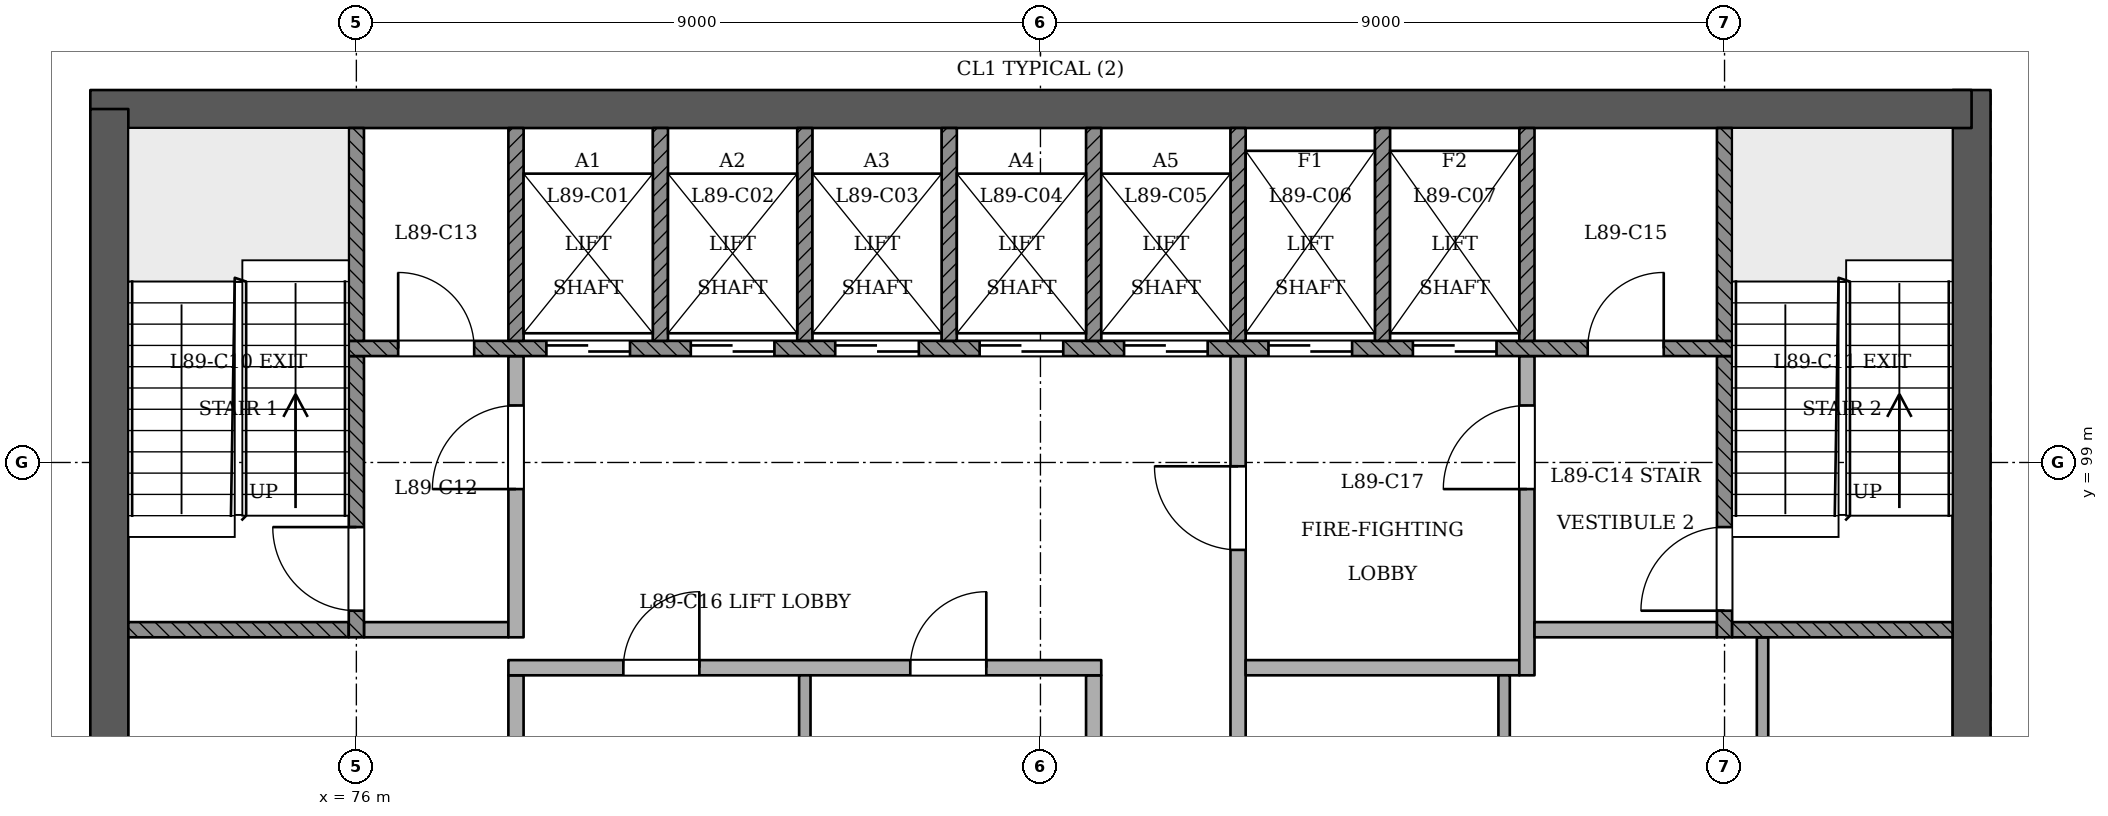
"""IFC4 building model, lengths in metres.
Left out: names, types, materials, properties, quantities, classifications, styles, units other than length and angle.
Written with IfcOpenShell. Run it as: python <this file> out.ifc"""

import sys

from ifc_helpers import new_model, si_unit, direction, frame, frame_2d, origin, place, context, subcontext, project, spatial, rectangle, extrude, element, fill, save


model = new_model("IFC4")
c1 = context("Model", 3, precision=1e-05, world=origin(), true_north=direction((0.0, 1.0)))
c2 = subcontext(c1, "Body", "Model", "MODEL_VIEW")
j1 = project(units=[si_unit("LENGTHUNIT", "METRE"), si_unit("PLANEANGLEUNIT", "RADIAN")], contexts=[c1])
p1 = place(None, origin())
s1 = spatial("IfcSite", under=j1, at=p1, CompositionType="ELEMENT")
p2 = place(p1, origin())
s2 = spatial("IfcBuilding", under=s1, at=p2, CompositionType="ELEMENT")
p3 = place(p2, frame((0.0, 0.0, 343.0)))
s3 = spatial("IfcBuildingStorey", under=s2, at=p3, CompositionType="ELEMENT", Elevation=343.0)
p4 = place(p3, frame((97.25, 93.15, 0.0), z_axis=(0.0, 0.0, 1.0), x_axis=(0.0, 1.0, 0.0)))
e1 = element("IfcWall", 1, at=p4, inside=s3, PredefinedType="SHEAR", context=c2, shape_type="SweptSolid", body=[
    extrude(rectangle(XDim=10.75, YDim=0.5, at=frame_2d((5.375, 0.0))), origin(), (0.0, 0.0, 1.0), 4.2),
])
p5 = place(p3, frame((97.25, 103.65, 0.0), z_axis=(0.0, 0.0, 1.0), x_axis=(-1.0, 0.0, 0.0)))
e2 = element("IfcWall", 2, at=p5, inside=s3, PredefinedType="SHEAR", context=c2, shape_type="SweptSolid", body=[
    extrude(rectangle(XDim=24.75, YDim=0.5, at=frame_2d((12.375, 0.0))), origin(), (0.0, 0.0, 1.0), 4.2),
])
p6 = place(p3, frame((72.75, 103.65, 0.0), z_axis=(0.0, 0.0, 1.0), x_axis=(0.0, -1.0, 0.0)))
e3 = element("IfcWall", 3, at=p6, inside=s3, PredefinedType="SHEAR", context=c2, shape_type="SweptSolid", body=[
    extrude(rectangle(XDim=10.75, YDim=0.5, at=frame_2d((5.375, 0.0))), origin(), (0.0, 0.0, 1.0), 4.2),
])
p7 = place(p3, frame((78.1, 93.4, 0.0), z_axis=(0.0, 0.0, 1.0), x_axis=(0.0, 1.0, 0.0)))
e4 = element("IfcWall", 4, at=p7, inside=s3, PredefinedType="PARTITIONING", context=c2, shape_type="SweptSolid", body=[
    extrude(rectangle(XDim=2.8, YDim=0.2, at=frame_2d((1.4, 0.0))), origin(), (0.0, 0.0, 1.0), 3.8),
])
p8 = place(p3, frame((81.9, 93.4, 0.0), z_axis=(0.0, 0.0, 1.0), x_axis=(0.0, 1.0, 0.0)))
e5 = element("IfcWall", 5, at=p8, inside=s3, PredefinedType="PARTITIONING", context=c2, shape_type="SweptSolid", body=[
    extrude(rectangle(XDim=2.8, YDim=0.15, at=frame_2d((1.4, 0.0))), origin(), (0.0, 0.0, 1.0), 3.8),
])
p9 = place(p3, frame((85.7, 93.4, 0.0), z_axis=(0.0, 0.0, 1.0), x_axis=(0.0, 1.0, 0.0)))
e6 = element("IfcWall", 6, at=p9, inside=s3, PredefinedType="PARTITIONING", context=c2, shape_type="SweptSolid", body=[
    extrude(rectangle(XDim=2.8, YDim=0.2, at=frame_2d((1.4, 0.0))), origin(), (0.0, 0.0, 1.0), 3.8),
])
p10 = place(p3, frame((87.6, 93.4, 0.0), z_axis=(0.0, 0.0, 1.0), x_axis=(0.0, 1.0, 0.0)))
e7 = element("IfcWall", 7, at=p10, inside=s3, PredefinedType="PARTITIONING", context=c2, shape_type="SweptSolid", body=[
    extrude(rectangle(XDim=7.0, YDim=0.2, at=frame_2d((3.5, 0.0))), origin(), (0.0, 0.0, 1.0), 3.8),
])
p11 = place(p10, frame((4.45, 0.0, 0.0)))
e8 = element("IfcOpeningElement", 8, at=p11, cuts=e7, PredefinedType="OPENING", context=c2, shape_type="SweptSolid", body=[
    extrude(rectangle(XDim=1.1, YDim=2.1, at=frame_2d((0.55, 1.05))), frame((0.0, 0.11, 0.0), z_axis=(0.0, -1.0, 0.0), x_axis=(1.0, 0.0, 0.0)), (0.0, 0.0, 1.0), 0.221),
])
p12 = place(p3, frame((91.1, 93.4, 0.0), z_axis=(0.0, 0.0, 1.0), x_axis=(0.0, 1.0, 0.0)))
e9 = element("IfcWall", 9, at=p12, inside=s3, PredefinedType="PARTITIONING", context=c2, shape_type="SweptSolid", body=[
    extrude(rectangle(XDim=2.8, YDim=0.15, at=frame_2d((1.4, 0.0))), origin(), (0.0, 0.0, 1.0), 3.8),
])
p13 = place(p3, frame((94.5, 93.4, 0.0), z_axis=(0.0, 0.0, 1.0), x_axis=(0.0, 1.0, 0.0)))
e10 = element("IfcWall", 10, at=p13, inside=s3, PredefinedType="PARTITIONING", context=c2, shape_type="SweptSolid", body=[
    extrude(rectangle(XDim=3.3, YDim=0.15, at=frame_2d((1.65, 0.0))), origin(), (0.0, 0.0, 1.0), 3.8),
])
p14 = place(p3, frame((78.0, 96.3, 0.0), z_axis=(0.0, 0.0, 1.0), x_axis=(1.0, 0.0, 0.0)))
e11 = element("IfcWall", 11, at=p14, inside=s3, PredefinedType="PARTITIONING", context=c2, shape_type="SweptSolid", body=[
    extrude(rectangle(XDim=7.8, YDim=0.2, at=frame_2d((3.9, 0.0))), origin(), (0.0, 0.0, 1.0), 3.8),
])
p15 = place(p14, frame((1.512, 0.0, 0.0)))
e12 = element("IfcOpeningElement", 12, at=p15, cuts=e11, PredefinedType="OPENING", context=c2, shape_type="SweptSolid", body=[
    extrude(rectangle(XDim=1.0, YDim=2.1, at=frame_2d((0.5, 1.05))), frame((0.0, 0.11, 0.0), z_axis=(0.0, -1.0, 0.0), x_axis=(1.0, 0.0, 0.0)), (0.0, 0.0, 1.0), 0.221),
])
p16 = place(p14, frame((5.288, 0.0, 0.0)))
e13 = element("IfcOpeningElement", 13, at=p16, cuts=e11, PredefinedType="OPENING", context=c2, shape_type="SweptSolid", body=[
    extrude(rectangle(XDim=1.0, YDim=2.1, at=frame_2d((0.5, 1.05))), frame((0.0, 0.11, 0.0), z_axis=(0.0, -1.0, 0.0), x_axis=(1.0, 0.0, 0.0)), (0.0, 0.0, 1.0), 0.221),
])
p17 = place(p3, frame((87.7, 96.3, 0.0), z_axis=(0.0, 0.0, 1.0), x_axis=(1.0, 0.0, 0.0)))
e14 = element("IfcWall", 14, at=p17, inside=s3, PredefinedType="PARTITIONING", context=c2, shape_type="SweptSolid", body=[
    extrude(rectangle(XDim=3.6, YDim=0.2, at=frame_2d((1.8, 0.0))), origin(), (0.0, 0.0, 1.0), 3.8),
])
p18 = place(p3, frame((91.4, 96.2, 0.0), z_axis=(0.0, 0.0, 1.0), x_axis=(0.0, 1.0, 0.0)))
e15 = element("IfcWall", 15, at=p18, inside=s3, PredefinedType="PARTITIONING", context=c2, shape_type="SweptSolid", body=[
    extrude(rectangle(XDim=4.2, YDim=0.2, at=frame_2d((2.1, 0.0))), origin(), (0.0, 0.0, 1.0), 3.8),
])
p19 = place(p18, frame((2.45, 0.0, 0.0)))
e16 = element("IfcOpeningElement", 16, at=p19, cuts=e15, PredefinedType="OPENING", context=c2, shape_type="SweptSolid", body=[
    extrude(rectangle(XDim=1.1, YDim=2.1, at=frame_2d((0.55, 1.05))), frame((0.0, 0.11, 0.0), z_axis=(0.0, -1.0, 0.0), x_axis=(1.0, 0.0, 0.0)), (0.0, 0.0, 1.0), 0.221),
])
p20 = place(p3, frame((73.0, 96.8, 0.0), z_axis=(0.0, 0.0, 1.0), x_axis=(1.0, 0.0, 0.0)))
e17 = element("IfcWall", 17, at=p20, inside=s3, PredefinedType="SOLIDWALL", context=c2, shape_type="SweptSolid", body=[
    extrude(rectangle(XDim=2.9, YDim=0.2, at=frame_2d((1.45, 0.0))), origin(), (0.0, 0.0, 1.0), 3.8),
])
p21 = place(p3, frame((76.0, 96.7, 0.0), z_axis=(0.0, 0.0, 1.0), x_axis=(0.0, 1.0, 0.0)))
e18 = element("IfcWall", 18, at=p21, inside=s3, PredefinedType="SOLIDWALL", context=c2, shape_type="SweptSolid", body=[
    extrude(rectangle(XDim=3.7, YDim=0.2, at=frame_2d((1.85, 0.0))), origin(), (0.0, 0.0, 1.0), 3.8),
])
p22 = place(p21, frame((0.35, 0.0, 0.0)))
e19 = element("IfcOpeningElement", 19, at=p22, cuts=e18, PredefinedType="OPENING", context=c2, shape_type="SweptSolid", body=[
    extrude(rectangle(XDim=1.1, YDim=2.1, at=frame_2d((0.55, 1.05))), frame((0.0, 0.11, 0.0), z_axis=(0.0, -1.0, 0.0), x_axis=(1.0, 0.0, 0.0)), (0.0, 0.0, 1.0), 0.221),
])
p23 = place(p3, frame((76.1, 96.8, 0.0), z_axis=(0.0, 0.0, 1.0), x_axis=(1.0, 0.0, 0.0)))
e20 = element("IfcWall", 20, at=p23, inside=s3, PredefinedType="PARTITIONING", context=c2, shape_type="SweptSolid", body=[
    extrude(rectangle(XDim=1.9, YDim=0.2, at=frame_2d((0.95, 0.0))), origin(), (0.0, 0.0, 1.0), 3.8),
])
p24 = place(p3, frame((78.1, 96.7, 0.0), z_axis=(0.0, 0.0, 1.0), x_axis=(0.0, 1.0, 0.0)))
e21 = element("IfcWall", 21, at=p24, inside=s3, PredefinedType="PARTITIONING", context=c2, shape_type="SweptSolid", body=[
    extrude(rectangle(XDim=3.7, YDim=0.2, at=frame_2d((1.85, 0.0))), origin(), (0.0, 0.0, 1.0), 3.8),
])
p25 = place(p24, frame((1.95, 0.0, 0.0)))
e22 = element("IfcOpeningElement", 22, at=p25, cuts=e21, PredefinedType="OPENING", context=c2, shape_type="SweptSolid", body=[
    extrude(rectangle(XDim=1.1, YDim=2.1, at=frame_2d((0.55, 1.05))), frame((0.0, 0.11, 0.0), z_axis=(0.0, -1.0, 0.0), x_axis=(1.0, 0.0, 0.0)), (0.0, 0.0, 1.0), 0.221),
])
p26 = place(p3, frame((91.5, 96.8, 0.0), z_axis=(0.0, 0.0, 1.0), x_axis=(1.0, 0.0, 0.0)))
e23 = element("IfcWall", 23, at=p26, inside=s3, PredefinedType="PARTITIONING", context=c2, shape_type="SweptSolid", body=[
    extrude(rectangle(XDim=2.4, YDim=0.2, at=frame_2d((1.2, 0.0))), origin(), (0.0, 0.0, 1.0), 3.8),
])
p27 = place(p3, frame((94.0, 96.7, 0.0), z_axis=(0.0, 0.0, 1.0), x_axis=(0.0, 1.0, 0.0)))
e24 = element("IfcWall", 24, at=p27, inside=s3, PredefinedType="SOLIDWALL", context=c2, shape_type="SweptSolid", body=[
    extrude(rectangle(XDim=3.7, YDim=0.2, at=frame_2d((1.85, 0.0))), origin(), (0.0, 0.0, 1.0), 3.8),
])
p28 = place(p27, frame((0.35, 0.0, 0.0)))
e25 = element("IfcOpeningElement", 25, at=p28, cuts=e24, PredefinedType="OPENING", context=c2, shape_type="SweptSolid", body=[
    extrude(rectangle(XDim=1.1, YDim=2.1, at=frame_2d((0.55, 1.05))), frame((0.0, 0.11, 0.0), z_axis=(0.0, -1.0, 0.0), x_axis=(1.0, 0.0, 0.0)), (0.0, 0.0, 1.0), 0.221),
])
p29 = place(p3, frame((94.1, 96.8, 0.0), z_axis=(0.0, 0.0, 1.0), x_axis=(1.0, 0.0, 0.0)))
e26 = element("IfcWall", 26, at=p29, inside=s3, PredefinedType="SOLIDWALL", context=c2, shape_type="SweptSolid", body=[
    extrude(rectangle(XDim=2.9, YDim=0.2, at=frame_2d((1.45, 0.0))), origin(), (0.0, 0.0, 1.0), 3.8),
])
p30 = place(p3, frame((75.9, 100.5, 0.0), z_axis=(0.0, 0.0, 1.0), x_axis=(1.0, 0.0, 0.0)))
e27 = element("IfcWall", 27, at=p30, inside=s3, PredefinedType="SOLIDWALL", context=c2, shape_type="SweptSolid", body=[
    extrude(rectangle(XDim=18.2, YDim=0.2, at=frame_2d((9.1, 0.0))), origin(), (0.0, 0.0, 1.0), 3.8),
])
p31 = place(p30, frame((2.6, 0.0, 0.0)))
e28 = element("IfcOpeningElement", 28, at=p31, cuts=e27, PredefinedType="OPENING", context=c2, shape_type="SweptSolid", body=[
    extrude(rectangle(XDim=1.1, YDim=2.1, at=frame_2d((0.55, 1.05))), frame((0.0, 0.11, 0.0), z_axis=(0.0, -1.0, 0.0), x_axis=(1.0, 0.0, 0.0)), (0.0, 0.0, 1.0), 0.221),
])
p32 = place(p30, frame((4.5, 0.0, 0.0)))
e29 = element("IfcOpeningElement", 29, at=p32, cuts=e27, PredefinedType="OPENING", context=c2, shape_type="SweptSolid", body=[
    extrude(rectangle(XDim=1.1, YDim=2.1, at=frame_2d((0.55, 1.05))), frame((0.0, 0.11, 0.0), z_axis=(0.0, -1.0, 0.0), x_axis=(1.0, 0.0, 0.0)), (0.0, 0.0, 1.0), 0.221),
])
p33 = place(p30, frame((6.4, 0.0, 0.0)))
e30 = element("IfcOpeningElement", 30, at=p33, cuts=e27, PredefinedType="OPENING", context=c2, shape_type="SweptSolid", body=[
    extrude(rectangle(XDim=1.1, YDim=2.1, at=frame_2d((0.55, 1.05))), frame((0.0, 0.11, 0.0), z_axis=(0.0, -1.0, 0.0), x_axis=(1.0, 0.0, 0.0)), (0.0, 0.0, 1.0), 0.221),
])
p34 = place(p30, frame((8.3, 0.0, 0.0)))
e31 = element("IfcOpeningElement", 31, at=p34, cuts=e27, PredefinedType="OPENING", context=c2, shape_type="SweptSolid", body=[
    extrude(rectangle(XDim=1.1, YDim=2.1, at=frame_2d((0.55, 1.05))), frame((0.0, 0.11, 0.0), z_axis=(0.0, -1.0, 0.0), x_axis=(1.0, 0.0, 0.0)), (0.0, 0.0, 1.0), 0.221),
])
p35 = place(p30, frame((10.2, 0.0, 0.0)))
e32 = element("IfcOpeningElement", 32, at=p35, cuts=e27, PredefinedType="OPENING", context=c2, shape_type="SweptSolid", body=[
    extrude(rectangle(XDim=1.1, YDim=2.1, at=frame_2d((0.55, 1.05))), frame((0.0, 0.11, 0.0), z_axis=(0.0, -1.0, 0.0), x_axis=(1.0, 0.0, 0.0)), (0.0, 0.0, 1.0), 0.221),
])
p36 = place(p30, frame((12.1, 0.0, 0.0)))
e33 = element("IfcOpeningElement", 33, at=p36, cuts=e27, PredefinedType="OPENING", context=c2, shape_type="SweptSolid", body=[
    extrude(rectangle(XDim=1.1, YDim=2.1, at=frame_2d((0.55, 1.05))), frame((0.0, 0.11, 0.0), z_axis=(0.0, -1.0, 0.0), x_axis=(1.0, 0.0, 0.0)), (0.0, 0.0, 1.0), 0.221),
])
p37 = place(p30, frame((14.0, 0.0, 0.0)))
e34 = element("IfcOpeningElement", 34, at=p37, cuts=e27, PredefinedType="OPENING", context=c2, shape_type="SweptSolid", body=[
    extrude(rectangle(XDim=1.1, YDim=2.1, at=frame_2d((0.55, 1.05))), frame((0.0, 0.11, 0.0), z_axis=(0.0, -1.0, 0.0), x_axis=(1.0, 0.0, 0.0)), (0.0, 0.0, 1.0), 0.221),
])
p38 = place(p30, frame((0.65, 0.0, 0.0)))
e35 = element("IfcOpeningElement", 35, at=p38, cuts=e27, PredefinedType="OPENING", context=c2, shape_type="SweptSolid", body=[
    extrude(rectangle(XDim=1.0, YDim=2.1, at=frame_2d((0.5, 1.05))), frame((0.0, 0.11, 0.0), z_axis=(0.0, -1.0, 0.0), x_axis=(1.0, 0.0, 0.0)), (0.0, 0.0, 1.0), 0.221),
])
p39 = place(p30, frame((16.3, 0.0, 0.0)))
e36 = element("IfcOpeningElement", 36, at=p39, cuts=e27, PredefinedType="OPENING", context=c2, shape_type="SweptSolid", body=[
    extrude(rectangle(XDim=1.0, YDim=2.1, at=frame_2d((0.5, 1.05))), frame((0.0, 0.11, 0.0), z_axis=(0.0, -1.0, 0.0), x_axis=(1.0, 0.0, 0.0)), (0.0, 0.0, 1.0), 0.221),
])
for number, where, z_axis, x_axis in (
    (37, (76.0, 100.6, 0.0), (0.0, 0.0, 1.0), (0.0, 1.0, 0.0)),
    (38, (78.1, 100.6, 0.0), (0.0, 0.0, 1.0), (0.0, 1.0, 0.0)),
    (39, (80.0, 100.6, 0.0), (0.0, 0.0, 1.0), (0.0, 1.0, 0.0)),
    (40, (81.9, 100.6, 0.0), (0.0, 0.0, 1.0), (0.0, 1.0, 0.0)),
    (41, (83.8, 100.6, 0.0), (0.0, 0.0, 1.0), (0.0, 1.0, 0.0)),
    (42, (85.7, 100.6, 0.0), (0.0, 0.0, 1.0), (0.0, 1.0, 0.0)),
    (43, (87.6, 100.6, 0.0), (0.0, 0.0, 1.0), (0.0, 1.0, 0.0)),
    (44, (89.5, 100.6, 0.0), (0.0, 0.0, 1.0), (0.0, 1.0, 0.0)),
    (45, (91.4, 100.6, 0.0), (0.0, 0.0, 1.0), (0.0, 1.0, 0.0)),
    (46, (94.0, 100.6, 0.0), (0.0, 0.0, 1.0), (0.0, 1.0, 0.0)),
):
    element("IfcWall", number, at=place(p3, frame(where, z_axis=z_axis, x_axis=x_axis)), inside=s3, PredefinedType="SOLIDWALL", context=c2, shape_type="SweptSolid", body=[
        extrude(rectangle(XDim=2.8, YDim=0.2, at=frame_2d((1.4, 0.0))), origin(), (0.0, 0.0, 1.0), 3.8),
    ])
p40 = place(p31, origin())
e47 = element("IfcDoor", 47, at=p40, inside=s3, OperationType="SLIDING_TO_RIGHT", PredefinedType="NOTDEFINED", context=c2, shape_type="SweptSolid", body=[
    extrude(rectangle(XDim=1.1, YDim=2.1, at=frame_2d((0.55, 1.05))), frame((0.0, 0.025, 0.0), z_axis=(0.0, -1.0, 0.0), x_axis=(1.0, 0.0, 0.0)), (0.0, 0.0, 1.0), 0.05),
])
fill(e28, e47)
p41 = place(p32, origin())
e48 = element("IfcDoor", 48, at=p41, inside=s3, OperationType="SLIDING_TO_LEFT", PredefinedType="NOTDEFINED", context=c2, shape_type="SweptSolid", body=[
    extrude(rectangle(XDim=1.1, YDim=2.1, at=frame_2d((0.55, 1.05))), frame((0.0, 0.025, 0.0), z_axis=(0.0, -1.0, 0.0), x_axis=(1.0, 0.0, 0.0)), (0.0, 0.0, 1.0), 0.05),
])
fill(e29, e48)
p42 = place(p33, origin())
e49 = element("IfcDoor", 49, at=p42, inside=s3, OperationType="SLIDING_TO_RIGHT", PredefinedType="NOTDEFINED", context=c2, shape_type="SweptSolid", body=[
    extrude(rectangle(XDim=1.1, YDim=2.1, at=frame_2d((0.55, 1.05))), frame((0.0, 0.025, 0.0), z_axis=(0.0, -1.0, 0.0), x_axis=(1.0, 0.0, 0.0)), (0.0, 0.0, 1.0), 0.05),
])
fill(e30, e49)
p43 = place(p34, origin())
e50 = element("IfcDoor", 50, at=p43, inside=s3, OperationType="SLIDING_TO_LEFT", PredefinedType="NOTDEFINED", context=c2, shape_type="SweptSolid", body=[
    extrude(rectangle(XDim=1.1, YDim=2.1, at=frame_2d((0.55, 1.05))), frame((0.0, 0.025, 0.0), z_axis=(0.0, -1.0, 0.0), x_axis=(1.0, 0.0, 0.0)), (0.0, 0.0, 1.0), 0.05),
])
fill(e31, e50)
p44 = place(p35, origin())
e51 = element("IfcDoor", 51, at=p44, inside=s3, OperationType="SLIDING_TO_RIGHT", PredefinedType="NOTDEFINED", context=c2, shape_type="SweptSolid", body=[
    extrude(rectangle(XDim=1.1, YDim=2.1, at=frame_2d((0.55, 1.05))), frame((0.0, 0.025, 0.0), z_axis=(0.0, -1.0, 0.0), x_axis=(1.0, 0.0, 0.0)), (0.0, 0.0, 1.0), 0.05),
])
fill(e32, e51)
p45 = place(p36, origin())
e52 = element("IfcDoor", 52, at=p45, inside=s3, OperationType="SLIDING_TO_RIGHT", PredefinedType="NOTDEFINED", context=c2, shape_type="SweptSolid", body=[
    extrude(rectangle(XDim=1.1, YDim=2.1, at=frame_2d((0.55, 1.05))), frame((0.0, 0.025, 0.0), z_axis=(0.0, -1.0, 0.0), x_axis=(1.0, 0.0, 0.0)), (0.0, 0.0, 1.0), 0.05),
])
fill(e33, e52)
p46 = place(p37, origin())
e53 = element("IfcDoor", 53, at=p46, inside=s3, OperationType="SLIDING_TO_LEFT", PredefinedType="NOTDEFINED", context=c2, shape_type="SweptSolid", body=[
    extrude(rectangle(XDim=1.1, YDim=2.1, at=frame_2d((0.55, 1.05))), frame((0.0, 0.025, 0.0), z_axis=(0.0, -1.0, 0.0), x_axis=(1.0, 0.0, 0.0)), (0.0, 0.0, 1.0), 0.05),
])
fill(e34, e53)
p47 = place(p22, origin())
e54 = element("IfcDoor", 54, at=p47, inside=s3, OperationType="SINGLE_SWING_RIGHT", PredefinedType="NOTDEFINED", context=c2, shape_type="SweptSolid", body=[
    extrude(rectangle(XDim=1.1, YDim=2.1, at=frame_2d((0.55, 1.05))), frame((0.0, 0.025, 0.0), z_axis=(0.0, -1.0, 0.0), x_axis=(1.0, 0.0, 0.0)), (0.0, 0.0, 1.0), 0.05),
])
fill(e19, e54)
p48 = place(p28, origin())
e55 = element("IfcDoor", 55, at=p48, inside=s3, OperationType="SINGLE_SWING_LEFT", PredefinedType="NOTDEFINED", context=c2, shape_type="SweptSolid", body=[
    extrude(rectangle(XDim=1.1, YDim=2.1, at=frame_2d((0.55, 1.05))), frame((0.0, 0.025, 0.0), z_axis=(0.0, -1.0, 0.0), x_axis=(1.0, 0.0, 0.0)), (0.0, 0.0, 1.0), 0.05),
])
fill(e25, e55)
p49 = place(p25, origin())
e56 = element("IfcDoor", 56, at=p49, inside=s3, OperationType="SINGLE_SWING_LEFT", PredefinedType="NOTDEFINED", context=c2, shape_type="SweptSolid", body=[
    extrude(rectangle(XDim=1.1, YDim=2.1, at=frame_2d((0.55, 1.05))), frame((0.0, 0.025, 0.0), z_axis=(0.0, -1.0, 0.0), x_axis=(1.0, 0.0, 0.0)), (0.0, 0.0, 1.0), 0.05),
])
fill(e22, e56)
p50 = place(p11, origin())
e57 = element("IfcDoor", 57, at=p50, inside=s3, OperationType="SINGLE_SWING_RIGHT", PredefinedType="NOTDEFINED", context=c2, shape_type="SweptSolid", body=[
    extrude(rectangle(XDim=1.1, YDim=2.1, at=frame_2d((0.55, 1.05))), frame((0.0, 0.025, 0.0), z_axis=(0.0, -1.0, 0.0), x_axis=(1.0, 0.0, 0.0)), (0.0, 0.0, 1.0), 0.05),
])
fill(e8, e57)
p51 = place(p19, origin())
e58 = element("IfcDoor", 58, at=p51, inside=s3, OperationType="SINGLE_SWING_LEFT", PredefinedType="NOTDEFINED", context=c2, shape_type="SweptSolid", body=[
    extrude(rectangle(XDim=1.1, YDim=2.1, at=frame_2d((0.55, 1.05))), frame((0.0, 0.025, 0.0), z_axis=(0.0, -1.0, 0.0), x_axis=(1.0, 0.0, 0.0)), (0.0, 0.0, 1.0), 0.05),
])
fill(e16, e58)
p52 = place(p38, origin())
e59 = element("IfcDoor", 59, at=p52, inside=s3, OperationType="SINGLE_SWING_LEFT", PredefinedType="NOTDEFINED", context=c2, shape_type="SweptSolid", body=[
    extrude(rectangle(XDim=1.0, YDim=2.1, at=frame_2d((0.5, 1.05))), frame((0.0, 0.025, 0.0), z_axis=(0.0, -1.0, 0.0), x_axis=(1.0, 0.0, 0.0)), (0.0, 0.0, 1.0), 0.05),
])
fill(e35, e59)
p53 = place(p39, origin())
e60 = element("IfcDoor", 60, at=p53, inside=s3, OperationType="SINGLE_SWING_RIGHT", PredefinedType="NOTDEFINED", context=c2, shape_type="SweptSolid", body=[
    extrude(rectangle(XDim=1.0, YDim=2.1, at=frame_2d((0.5, 1.05))), frame((0.0, 0.025, 0.0), z_axis=(0.0, -1.0, 0.0), x_axis=(1.0, 0.0, 0.0)), (0.0, 0.0, 1.0), 0.05),
])
fill(e36, e60)
p54 = place(p15, origin())
e61 = element("IfcDoor", 61, at=p54, inside=s3, OperationType="SINGLE_SWING_RIGHT", PredefinedType="NOTDEFINED", context=c2, shape_type="SweptSolid", body=[
    extrude(rectangle(XDim=1.0, YDim=2.1, at=frame_2d((0.5, 1.05))), frame((0.0, 0.025, 0.0), z_axis=(0.0, -1.0, 0.0), x_axis=(1.0, 0.0, 0.0)), (0.0, 0.0, 1.0), 0.05),
])
fill(e12, e61)
p55 = place(p16, origin())
e62 = element("IfcDoor", 62, at=p55, inside=s3, OperationType="SINGLE_SWING_RIGHT", PredefinedType="NOTDEFINED", context=c2, shape_type="SweptSolid", body=[
    extrude(rectangle(XDim=1.0, YDim=2.1, at=frame_2d((0.5, 1.05))), frame((0.0, 0.025, 0.0), z_axis=(0.0, -1.0, 0.0), x_axis=(1.0, 0.0, 0.0)), (0.0, 0.0, 1.0), 0.05),
])
fill(e13, e62)
save(model, sys.argv[1])
